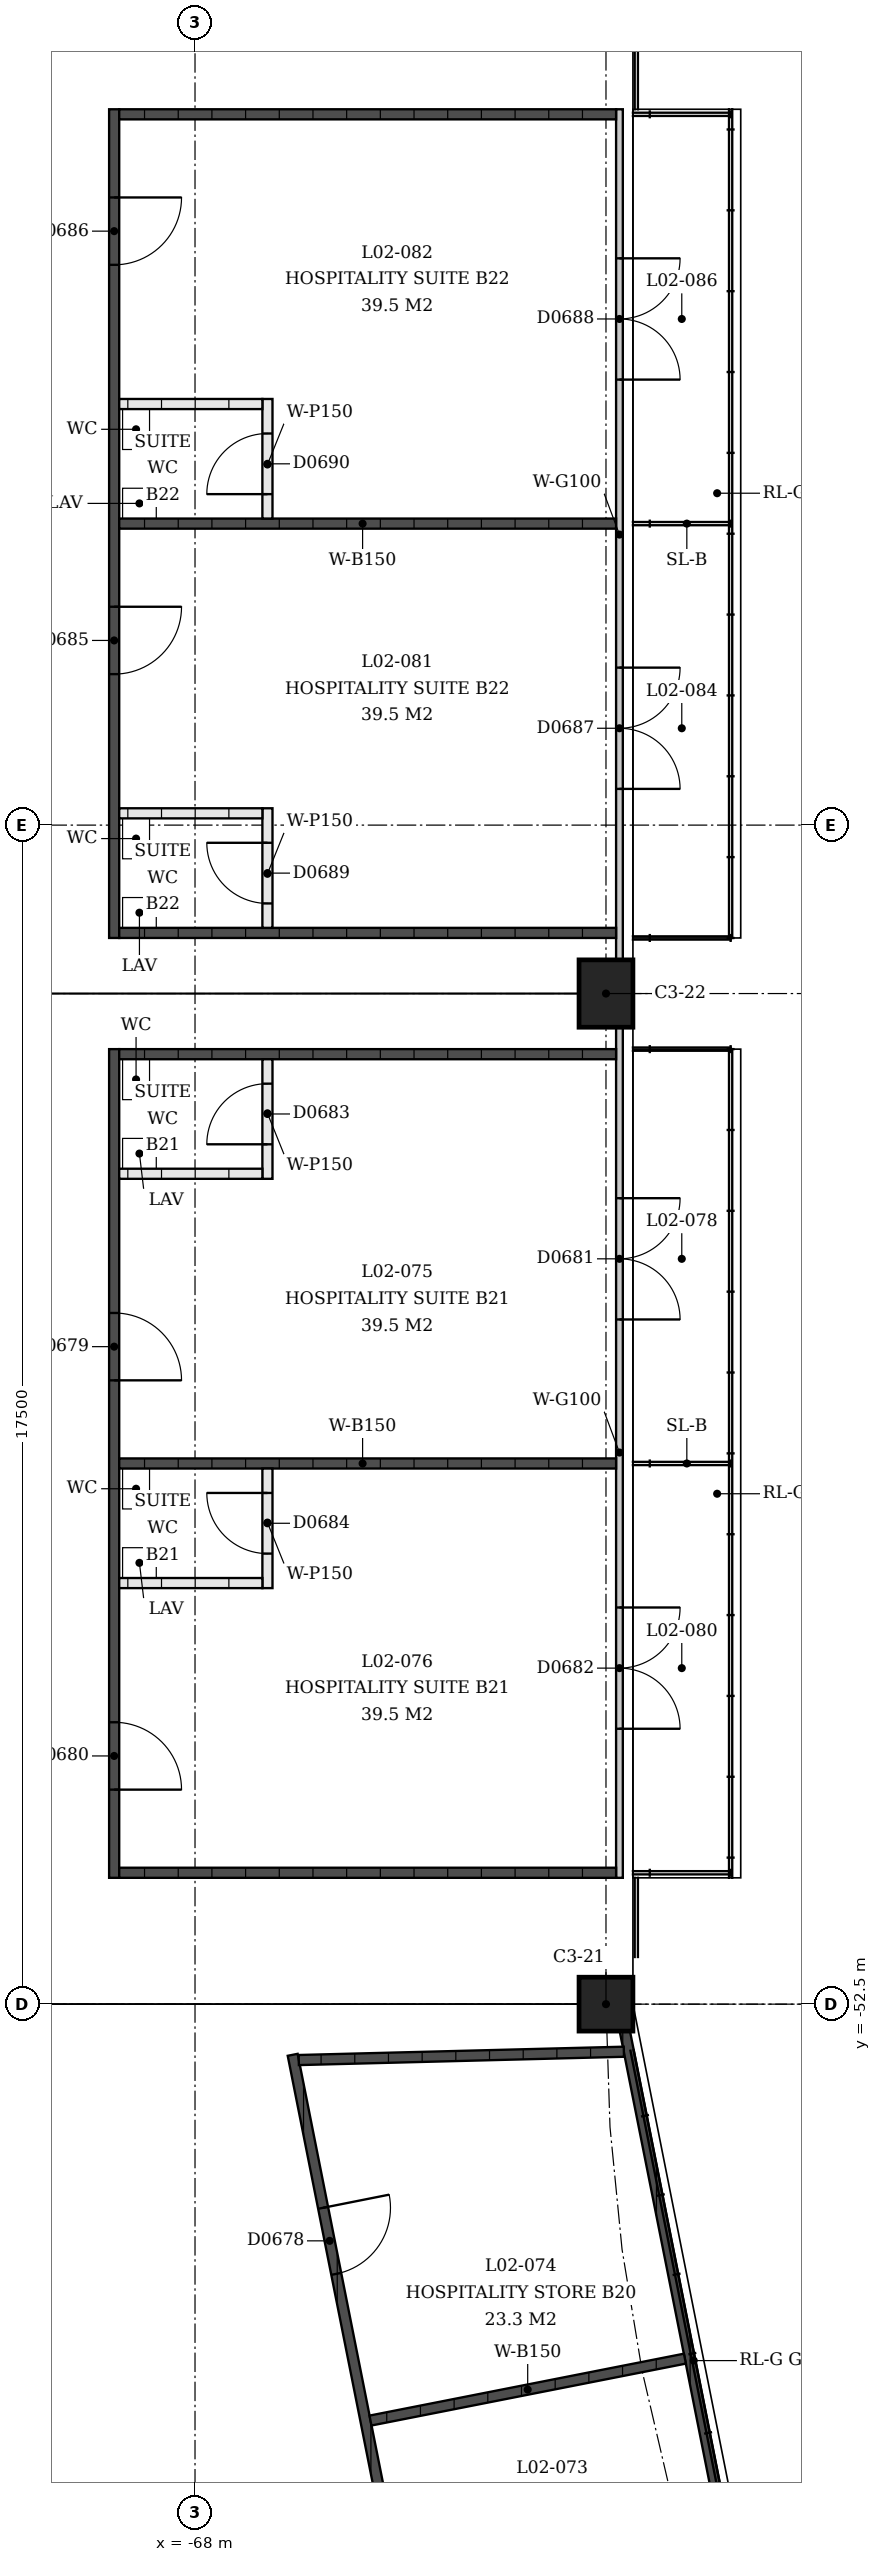
"""IFC4 building model, lengths in metres.
Left out: names, types, materials, properties, quantities, classifications, styles, units other than length and angle.
Written with IfcOpenShell. Run it as: python <this file> out.ifc"""

import sys

from ifc_helpers import new_model, si_unit, direction, frame, frame_2d, origin, origin_2d, place, context, subcontext, project, spatial, rectangle, extrude, element, fill, save


model = new_model("IFC4")
c1 = context("Model", 3, precision=1e-05, world=origin(), true_north=direction((0.0, 1.0)))
c2 = subcontext(c1, "Body", "Model", "MODEL_VIEW")
j1 = project(units=[si_unit("LENGTHUNIT", "METRE"), si_unit("PLANEANGLEUNIT", "RADIAN")], contexts=[c1])
p1 = place(None, origin())
s1 = spatial("IfcSite", under=j1, at=p1, CompositionType="ELEMENT")
p2 = place(p1, origin())
s2 = spatial("IfcBuilding", under=s1, at=p2, CompositionType="ELEMENT")
p3 = place(p2, frame((0.0, 0.0, 9.0)))
s3 = spatial("IfcBuildingStorey", under=s2, at=p3, CompositionType="ELEMENT", Elevation=9.0)
p4 = place(p3, frame((-61.9, -52.5, 0.0), z_axis=(0.0, 0.0, 1.0), x_axis=(0.0, -1.0, 0.0)))
e1 = element("IfcColumn", 1, at=p4, inside=s3, PredefinedType="COLUMN", context=c2, shape_type="SweptSolid", body=[
    extrude(rectangle(XDim=0.8, YDim=0.8, at=origin_2d()), origin(), (0.0, 0.0, 1.0), 4.5),
])
p5 = place(p3, frame((-61.9, -37.5, 0.0), z_axis=(0.0, 0.0, 1.0), x_axis=(0.0, -1.0, 0.0)))
e2 = element("IfcColumn", 2, at=p5, inside=s3, PredefinedType="COLUMN", context=c2, shape_type="SweptSolid", body=[
    extrude(rectangle(XDim=1.0, YDim=0.8, at=origin_2d()), origin(), (0.0, 0.0, 1.0), 4.5),
])
p6 = place(p3, frame((-59.681, -62.65, 0.0), z_axis=(0.0, 0.0, 1.0), x_axis=(-0.195086492048, 0.980786042223, 0.0)))
e3 = element("IfcWall", 3, at=p6, inside=s3, PredefinedType="SOLIDWALL", context=c2, shape_type="SweptSolid", body=[
    extrude(rectangle(XDim=9.941, YDim=0.15, at=frame_2d((4.971, 0.0))), origin(), (0.0, 0.0, 1.0), 3.0),
])
p7 = place(p3, frame((-64.385, -64.138, 0.0), z_axis=(0.0, 0.0, 1.0), x_axis=(-0.195083899224, 0.980786557954, 0.0)))
e4 = element("IfcWall", 4, at=p7, inside=s3, PredefinedType="SOLIDWALL", context=c2, shape_type="SweptSolid", body=[
    extrude(rectangle(XDim=11.099, YDim=0.15, at=frame_2d((5.55, 0.0))), origin(), (0.0, 0.0, 1.0), 3.0),
])
p8 = place(p7, frame((2.315, 0.0, 0.0)))
e5 = element("IfcOpeningElement", 5, at=p8, cuts=e4, PredefinedType="OPENING", context=c2, shape_type="SweptSolid", body=[
    extrude(rectangle(XDim=1.0, YDim=2.1, at=frame_2d((0.5, 1.05))), frame((0.0, 0.075, 0.0), z_axis=(0.0, -1.0, 0.0), x_axis=(1.0, 0.0, 0.0)), (0.0, 0.0, 1.0), 0.15),
])
p9 = place(p7, frame((7.784, 0.0, 0.0)))
e6 = element("IfcOpeningElement", 6, at=p9, cuts=e4, PredefinedType="OPENING", context=c2, shape_type="SweptSolid", body=[
    extrude(rectangle(XDim=1.0, YDim=2.1, at=frame_2d((0.5, 1.05))), frame((0.0, 0.075, 0.0), z_axis=(0.0, -1.0, 0.0), x_axis=(1.0, 0.0, 0.0)), (0.0, 0.0, 1.0), 0.15),
])
p10 = place(p3, frame((-60.728, -57.762, 0.0), z_axis=(0.0, 0.0, 1.0), x_axis=(-0.981172300115, -0.19313445443, 0.0)))
e7 = element("IfcWall", 7, at=p10, inside=s3, PredefinedType="SOLIDWALL", context=c2, shape_type="SweptSolid", body=[
    extrude(rectangle(XDim=4.757, YDim=0.15, at=frame_2d((2.378, 0.0))), origin(), (0.0, 0.0, 1.0), 3.0),
])
p11 = place(p3, frame((-61.635, -53.206, 0.0), z_axis=(0.0, 0.0, 1.0), x_axis=(-0.999673752981, -0.025541879345, 0.0)))
e8 = element("IfcWall", 8, at=p11, inside=s3, PredefinedType="SOLIDWALL", context=c2, shape_type="SweptSolid", body=[
    extrude(rectangle(XDim=4.827, YDim=0.15, at=frame_2d((2.414, 0.0))), origin(), (0.0, 0.0, 1.0), 3.0),
])
p12 = place(p3, frame((-61.7, -38.0, 0.0), z_axis=(0.0, 0.0, 1.0), x_axis=(0.0, -1.0, 0.0)))
e9 = element("IfcWall", 9, at=p12, inside=s3, PredefinedType="PARTITIONING", context=c2, shape_type="SweptSolid", body=[
    extrude(rectangle(XDim=12.625, YDim=0.1, at=frame_2d((6.312, 0.0))), origin(), (0.0, 0.0, 1.0), 3.0),
])
p13 = place(p12, frame((2.538, 0.0, 0.0)))
e10 = element("IfcOpeningElement", 10, at=p13, cuts=e9, PredefinedType="OPENING", context=c2, shape_type="SweptSolid", body=[
    extrude(rectangle(XDim=1.8, YDim=2.1, at=frame_2d((0.9, 1.05))), frame((0.0, 0.05, 0.0), z_axis=(0.0, -1.0, 0.0), x_axis=(1.0, 0.0, 0.0)), (0.0, 0.0, 1.0), 0.1),
])
p14 = place(p12, frame((8.613, 0.0, 0.0)))
e11 = element("IfcOpeningElement", 11, at=p14, cuts=e9, PredefinedType="OPENING", context=c2, shape_type="SweptSolid", body=[
    extrude(rectangle(XDim=1.8, YDim=2.1, at=frame_2d((0.9, 1.05))), frame((0.0, 0.05, 0.0), z_axis=(0.0, -1.0, 0.0), x_axis=(1.0, 0.0, 0.0)), (0.0, 0.0, 1.0), 0.1),
])
p15 = place(p3, frame((-69.2, -38.325, 0.0), z_axis=(0.0, 0.0, 1.0), x_axis=(0.0, -1.0, 0.0)))
e12 = element("IfcWall", 12, at=p15, inside=s3, PredefinedType="SOLIDWALL", context=c2, shape_type="SweptSolid", body=[
    extrude(rectangle(XDim=12.3, YDim=0.15, at=frame_2d((6.15, 0.0))), origin(), (0.0, 0.0, 1.0), 3.0),
])
p16 = place(p15, frame((3.916, 0.0, 0.0)))
e13 = element("IfcOpeningElement", 13, at=p16, cuts=e12, PredefinedType="OPENING", context=c2, shape_type="SweptSolid", body=[
    extrude(rectangle(XDim=1.0, YDim=2.1, at=frame_2d((0.5, 1.05))), frame((0.0, 0.075, 0.0), z_axis=(0.0, -1.0, 0.0), x_axis=(1.0, 0.0, 0.0)), (0.0, 0.0, 1.0), 0.15),
])
p17 = place(p15, frame((9.991, 0.0, 0.0)))
e14 = element("IfcOpeningElement", 14, at=p17, cuts=e12, PredefinedType="OPENING", context=c2, shape_type="SweptSolid", body=[
    extrude(rectangle(XDim=1.0, YDim=2.1, at=frame_2d((0.5, 1.05))), frame((0.0, 0.075, 0.0), z_axis=(0.0, -1.0, 0.0), x_axis=(1.0, 0.0, 0.0)), (0.0, 0.0, 1.0), 0.15),
])
for number, where, z_axis, x_axis in (
    (15, (-61.75, -38.4, 0.0), (0.0, 0.0, 1.0), (-1.0, 0.0, 0.0)),
    (16, (-61.75, -44.475, 0.0), (0.0, 0.0, 1.0), (-1.0, 0.0, 0.0)),
    (17, (-61.75, -50.55, 0.0), (0.0, 0.0, 1.0), (-1.0, 0.0, 0.0)),
):
    element("IfcWall", number, at=place(p3, frame(where, z_axis=z_axis, x_axis=x_axis)), inside=s3, PredefinedType="SOLIDWALL", context=c2, shape_type="SweptSolid", body=[
        extrude(rectangle(XDim=7.375, YDim=0.15, at=frame_2d((3.688, 0.0))), origin(), (0.0, 0.0, 1.0), 3.0),
    ])
p18 = place(p3, frame((-66.925, -38.475, 0.0), z_axis=(0.0, 0.0, 1.0), x_axis=(0.0, -1.0, 0.0)))
e18 = element("IfcWall", 18, at=p18, inside=s3, PredefinedType="PARTITIONING", context=c2, shape_type="SweptSolid", body=[
    extrude(rectangle(XDim=1.775, YDim=0.15, at=frame_2d((0.887, 0.0))), origin(), (0.0, 0.0, 1.0), 3.0),
])
p19 = place(p18, frame((0.363, 0.0, 0.0)))
e19 = element("IfcOpeningElement", 19, at=p19, cuts=e18, PredefinedType="OPENING", context=c2, shape_type="SweptSolid", body=[
    extrude(rectangle(XDim=0.9, YDim=2.1, at=frame_2d((0.45, 1.05))), frame((0.0, 0.075, 0.0), z_axis=(0.0, -1.0, 0.0), x_axis=(1.0, 0.0, 0.0)), (0.0, 0.0, 1.0), 0.15),
])
p20 = place(p3, frame((-67.0, -40.175, 0.0), z_axis=(0.0, 0.0, 1.0), x_axis=(-1.0, 0.0, 0.0)))
e20 = element("IfcWall", 20, at=p20, inside=s3, PredefinedType="PARTITIONING", context=c2, shape_type="SweptSolid", body=[
    extrude(rectangle(XDim=2.125, YDim=0.15, at=frame_2d((1.062, 0.0))), origin(), (0.0, 0.0, 1.0), 3.0),
])
p21 = place(p3, frame((-66.925, -44.55, 0.0), z_axis=(0.0, 0.0, 1.0), x_axis=(0.0, -1.0, 0.0)))
e21 = element("IfcWall", 21, at=p21, inside=s3, PredefinedType="PARTITIONING", context=c2, shape_type="SweptSolid", body=[
    extrude(rectangle(XDim=1.775, YDim=0.15, at=frame_2d((0.887, 0.0))), origin(), (0.0, 0.0, 1.0), 3.0),
])
p22 = place(p21, frame((0.363, 0.0, 0.0)))
e22 = element("IfcOpeningElement", 22, at=p22, cuts=e21, PredefinedType="OPENING", context=c2, shape_type="SweptSolid", body=[
    extrude(rectangle(XDim=0.9, YDim=2.1, at=frame_2d((0.45, 1.05))), frame((0.0, 0.075, 0.0), z_axis=(0.0, -1.0, 0.0), x_axis=(1.0, 0.0, 0.0)), (0.0, 0.0, 1.0), 0.15),
])
p23 = place(p3, frame((-67.0, -46.25, 0.0), z_axis=(0.0, 0.0, 1.0), x_axis=(-1.0, 0.0, 0.0)))
e23 = element("IfcWall", 23, at=p23, inside=s3, PredefinedType="PARTITIONING", context=c2, shape_type="SweptSolid", body=[
    extrude(rectangle(XDim=2.125, YDim=0.15, at=frame_2d((1.062, 0.0))), origin(), (0.0, 0.0, 1.0), 3.0),
])
p24 = place(p3, frame((-61.7, -37.0, 0.0), z_axis=(0.0, 0.0, 1.0), x_axis=(0.0, 1.0, 0.0)))
e24 = element("IfcWall", 24, at=p24, inside=s3, PredefinedType="PARTITIONING", context=c2, shape_type="SweptSolid", body=[
    extrude(rectangle(XDim=12.625, YDim=0.1, at=frame_2d((6.312, 0.0))), origin(), (0.0, 0.0, 1.0), 3.0),
])
p25 = place(p24, frame((2.538, 0.0, 0.0)))
e25 = element("IfcOpeningElement", 25, at=p25, cuts=e24, PredefinedType="OPENING", context=c2, shape_type="SweptSolid", body=[
    extrude(rectangle(XDim=1.8, YDim=2.1, at=frame_2d((0.9, 1.05))), frame((0.0, 0.05, 0.0), z_axis=(0.0, -1.0, 0.0), x_axis=(1.0, 0.0, 0.0)), (0.0, 0.0, 1.0), 0.1),
])
p26 = place(p24, frame((8.613, 0.0, 0.0)))
e26 = element("IfcOpeningElement", 26, at=p26, cuts=e24, PredefinedType="OPENING", context=c2, shape_type="SweptSolid", body=[
    extrude(rectangle(XDim=1.8, YDim=2.1, at=frame_2d((0.9, 1.05))), frame((0.0, 0.05, 0.0), z_axis=(0.0, -1.0, 0.0), x_axis=(1.0, 0.0, 0.0)), (0.0, 0.0, 1.0), 0.1),
])
p27 = place(p3, frame((-69.2, -36.675, 0.0), z_axis=(0.0, 0.0, 1.0), x_axis=(0.0, 1.0, 0.0)))
e27 = element("IfcWall", 27, at=p27, inside=s3, PredefinedType="SOLIDWALL", context=c2, shape_type="SweptSolid", body=[
    extrude(rectangle(XDim=12.3, YDim=0.15, at=frame_2d((6.15, 0.0))), origin(), (0.0, 0.0, 1.0), 3.0),
])
p28 = place(p27, frame((3.916, 0.0, 0.0)))
e28 = element("IfcOpeningElement", 28, at=p28, cuts=e27, PredefinedType="OPENING", context=c2, shape_type="SweptSolid", body=[
    extrude(rectangle(XDim=1.0, YDim=2.1, at=frame_2d((0.5, 1.05))), frame((0.0, 0.075, 0.0), z_axis=(0.0, -1.0, 0.0), x_axis=(1.0, 0.0, 0.0)), (0.0, 0.0, 1.0), 0.15),
])
p29 = place(p27, frame((9.991, 0.0, 0.0)))
e29 = element("IfcOpeningElement", 29, at=p29, cuts=e27, PredefinedType="OPENING", context=c2, shape_type="SweptSolid", body=[
    extrude(rectangle(XDim=1.0, YDim=2.1, at=frame_2d((0.5, 1.05))), frame((0.0, 0.075, 0.0), z_axis=(0.0, -1.0, 0.0), x_axis=(1.0, 0.0, 0.0)), (0.0, 0.0, 1.0), 0.15),
])
for number, where, z_axis, x_axis in (
    (30, (-61.75, -36.6, 0.0), (0.0, 0.0, 1.0), (-1.0, 0.0, 0.0)),
    (31, (-61.75, -30.525, 0.0), (0.0, 0.0, 1.0), (-1.0, 0.0, 0.0)),
    (32, (-61.75, -24.45, 0.0), (0.0, 0.0, 1.0), (-1.0, 0.0, 0.0)),
):
    element("IfcWall", number, at=place(p3, frame(where, z_axis=z_axis, x_axis=x_axis)), inside=s3, PredefinedType="SOLIDWALL", context=c2, shape_type="SweptSolid", body=[
        extrude(rectangle(XDim=7.375, YDim=0.15, at=frame_2d((3.688, 0.0))), origin(), (0.0, 0.0, 1.0), 3.0),
    ])
p30 = place(p3, frame((-66.925, -36.525, 0.0), z_axis=(0.0, 0.0, 1.0), x_axis=(0.0, 1.0, 0.0)))
e33 = element("IfcWall", 33, at=p30, inside=s3, PredefinedType="PARTITIONING", context=c2, shape_type="SweptSolid", body=[
    extrude(rectangle(XDim=1.775, YDim=0.15, at=frame_2d((0.887, 0.0))), origin(), (0.0, 0.0, 1.0), 3.0),
])
p31 = place(p30, frame((0.363, 0.0, 0.0)))
e34 = element("IfcOpeningElement", 34, at=p31, cuts=e33, PredefinedType="OPENING", context=c2, shape_type="SweptSolid", body=[
    extrude(rectangle(XDim=0.9, YDim=2.1, at=frame_2d((0.45, 1.05))), frame((0.0, 0.075, 0.0), z_axis=(0.0, -1.0, 0.0), x_axis=(1.0, 0.0, 0.0)), (0.0, 0.0, 1.0), 0.15),
])
p32 = place(p3, frame((-67.0, -34.825, 0.0), z_axis=(0.0, 0.0, 1.0), x_axis=(-1.0, 0.0, 0.0)))
e35 = element("IfcWall", 35, at=p32, inside=s3, PredefinedType="PARTITIONING", context=c2, shape_type="SweptSolid", body=[
    extrude(rectangle(XDim=2.125, YDim=0.15, at=frame_2d((1.062, 0.0))), origin(), (0.0, 0.0, 1.0), 3.0),
])
p33 = place(p3, frame((-66.925, -30.45, 0.0), z_axis=(0.0, 0.0, 1.0), x_axis=(0.0, 1.0, 0.0)))
e36 = element("IfcWall", 36, at=p33, inside=s3, PredefinedType="PARTITIONING", context=c2, shape_type="SweptSolid", body=[
    extrude(rectangle(XDim=1.775, YDim=0.15, at=frame_2d((0.887, 0.0))), origin(), (0.0, 0.0, 1.0), 3.0),
])
p34 = place(p33, frame((0.363, 0.0, 0.0)))
e37 = element("IfcOpeningElement", 37, at=p34, cuts=e36, PredefinedType="OPENING", context=c2, shape_type="SweptSolid", body=[
    extrude(rectangle(XDim=0.9, YDim=2.1, at=frame_2d((0.45, 1.05))), frame((0.0, 0.075, 0.0), z_axis=(0.0, -1.0, 0.0), x_axis=(1.0, 0.0, 0.0)), (0.0, 0.0, 1.0), 0.15),
])
p35 = place(p3, frame((-67.0, -28.75, 0.0), z_axis=(0.0, 0.0, 1.0), x_axis=(-1.0, 0.0, 0.0)))
e38 = element("IfcWall", 38, at=p35, inside=s3, PredefinedType="PARTITIONING", context=c2, shape_type="SweptSolid", body=[
    extrude(rectangle(XDim=2.125, YDim=0.15, at=frame_2d((1.062, 0.0))), origin(), (0.0, 0.0, 1.0), 3.0),
])
p36 = place(p9, origin())
e39 = element("IfcDoor", 39, at=p36, inside=s3, OperationType="SINGLE_SWING_RIGHT", PredefinedType="DOOR", context=c2, shape_type="SweptSolid", body=[
    extrude(rectangle(XDim=1.0, YDim=2.1, at=frame_2d((0.5, 1.05))), frame((0.0, 0.025, 0.0), z_axis=(0.0, -1.0, 0.0), x_axis=(1.0, 0.0, 0.0)), (0.0, 0.0, 1.0), 0.05),
])
fill(e6, e39)
p37 = place(p16, origin())
e40 = element("IfcDoor", 40, at=p37, inside=s3, OperationType="SINGLE_SWING_LEFT", PredefinedType="DOOR", context=c2, shape_type="SweptSolid", body=[
    extrude(rectangle(XDim=1.0, YDim=2.1, at=frame_2d((0.5, 1.05))), frame((0.0, 0.025, 0.0), z_axis=(0.0, -1.0, 0.0), x_axis=(1.0, 0.0, 0.0)), (0.0, 0.0, 1.0), 0.05),
])
fill(e13, e40)
p38 = place(p17, origin())
e41 = element("IfcDoor", 41, at=p38, inside=s3, OperationType="SINGLE_SWING_LEFT", PredefinedType="DOOR", context=c2, shape_type="SweptSolid", body=[
    extrude(rectangle(XDim=1.0, YDim=2.1, at=frame_2d((0.5, 1.05))), frame((0.0, 0.025, 0.0), z_axis=(0.0, -1.0, 0.0), x_axis=(1.0, 0.0, 0.0)), (0.0, 0.0, 1.0), 0.05),
])
fill(e14, e41)
p39 = place(p13, origin())
e42 = element("IfcDoor", 42, at=p39, inside=s3, OperationType="DOUBLE_DOOR_SINGLE_SWING", PredefinedType="DOOR", context=c2, shape_type="SweptSolid", body=[
    extrude(rectangle(XDim=1.8, YDim=2.1, at=frame_2d((0.9, 1.05))), frame((0.0, 0.025, 0.0), z_axis=(0.0, -1.0, 0.0), x_axis=(1.0, 0.0, 0.0)), (0.0, 0.0, 1.0), 0.05),
])
fill(e10, e42)
p40 = place(p14, origin())
e43 = element("IfcDoor", 43, at=p40, inside=s3, OperationType="DOUBLE_DOOR_SINGLE_SWING", PredefinedType="DOOR", context=c2, shape_type="SweptSolid", body=[
    extrude(rectangle(XDim=1.8, YDim=2.1, at=frame_2d((0.9, 1.05))), frame((0.0, 0.025, 0.0), z_axis=(0.0, -1.0, 0.0), x_axis=(1.0, 0.0, 0.0)), (0.0, 0.0, 1.0), 0.05),
])
fill(e11, e43)
p41 = place(p19, origin())
e44 = element("IfcDoor", 44, at=p41, inside=s3, OperationType="SINGLE_SWING_RIGHT", PredefinedType="DOOR", context=c2, shape_type="SweptSolid", body=[
    extrude(rectangle(XDim=0.9, YDim=2.1, at=frame_2d((0.45, 1.05))), frame((0.0, 0.025, 0.0), z_axis=(0.0, -1.0, 0.0), x_axis=(1.0, 0.0, 0.0)), (0.0, 0.0, 1.0), 0.05),
])
fill(e19, e44)
p42 = place(p22, origin())
e45 = element("IfcDoor", 45, at=p42, inside=s3, OperationType="SINGLE_SWING_LEFT", PredefinedType="DOOR", context=c2, shape_type="SweptSolid", body=[
    extrude(rectangle(XDim=0.9, YDim=2.1, at=frame_2d((0.45, 1.05))), frame((0.0, 0.025, 0.0), z_axis=(0.0, -1.0, 0.0), x_axis=(1.0, 0.0, 0.0)), (0.0, 0.0, 1.0), 0.05),
])
fill(e22, e45)
p43 = place(p28, origin())
e46 = element("IfcDoor", 46, at=p43, inside=s3, OperationType="SINGLE_SWING_RIGHT", PredefinedType="DOOR", context=c2, shape_type="SweptSolid", body=[
    extrude(rectangle(XDim=1.0, YDim=2.1, at=frame_2d((0.5, 1.05))), frame((0.0, 0.025, 0.0), z_axis=(0.0, -1.0, 0.0), x_axis=(1.0, 0.0, 0.0)), (0.0, 0.0, 1.0), 0.05),
])
fill(e28, e46)
p44 = place(p29, origin())
e47 = element("IfcDoor", 47, at=p44, inside=s3, OperationType="SINGLE_SWING_RIGHT", PredefinedType="DOOR", context=c2, shape_type="SweptSolid", body=[
    extrude(rectangle(XDim=1.0, YDim=2.1, at=frame_2d((0.5, 1.05))), frame((0.0, 0.025, 0.0), z_axis=(0.0, -1.0, 0.0), x_axis=(1.0, 0.0, 0.0)), (0.0, 0.0, 1.0), 0.05),
])
fill(e29, e47)
p45 = place(p25, origin())
e48 = element("IfcDoor", 48, at=p45, inside=s3, OperationType="DOUBLE_DOOR_SINGLE_SWING", PredefinedType="DOOR", context=c2, shape_type="SweptSolid", body=[
    extrude(rectangle(XDim=1.8, YDim=2.1, at=frame_2d((0.9, 1.05))), frame((0.0, 0.025, 0.0), z_axis=(0.0, -1.0, 0.0), x_axis=(1.0, 0.0, 0.0)), (0.0, 0.0, 1.0), 0.05),
])
fill(e25, e48)
p46 = place(p26, origin())
e49 = element("IfcDoor", 49, at=p46, inside=s3, OperationType="DOUBLE_DOOR_SINGLE_SWING", PredefinedType="DOOR", context=c2, shape_type="SweptSolid", body=[
    extrude(rectangle(XDim=1.8, YDim=2.1, at=frame_2d((0.9, 1.05))), frame((0.0, 0.025, 0.0), z_axis=(0.0, -1.0, 0.0), x_axis=(1.0, 0.0, 0.0)), (0.0, 0.0, 1.0), 0.05),
])
fill(e26, e49)
p47 = place(p31, origin())
e50 = element("IfcDoor", 50, at=p47, inside=s3, OperationType="SINGLE_SWING_LEFT", PredefinedType="DOOR", context=c2, shape_type="SweptSolid", body=[
    extrude(rectangle(XDim=0.9, YDim=2.1, at=frame_2d((0.45, 1.05))), frame((0.0, 0.025, 0.0), z_axis=(0.0, -1.0, 0.0), x_axis=(1.0, 0.0, 0.0)), (0.0, 0.0, 1.0), 0.05),
])
fill(e34, e50)
p48 = place(p34, origin())
e51 = element("IfcDoor", 51, at=p48, inside=s3, OperationType="SINGLE_SWING_RIGHT", PredefinedType="DOOR", context=c2, shape_type="SweptSolid", body=[
    extrude(rectangle(XDim=0.9, YDim=2.1, at=frame_2d((0.45, 1.05))), frame((0.0, 0.025, 0.0), z_axis=(0.0, -1.0, 0.0), x_axis=(1.0, 0.0, 0.0)), (0.0, 0.0, 1.0), 0.05),
])
fill(e37, e51)
save(model, sys.argv[1])
